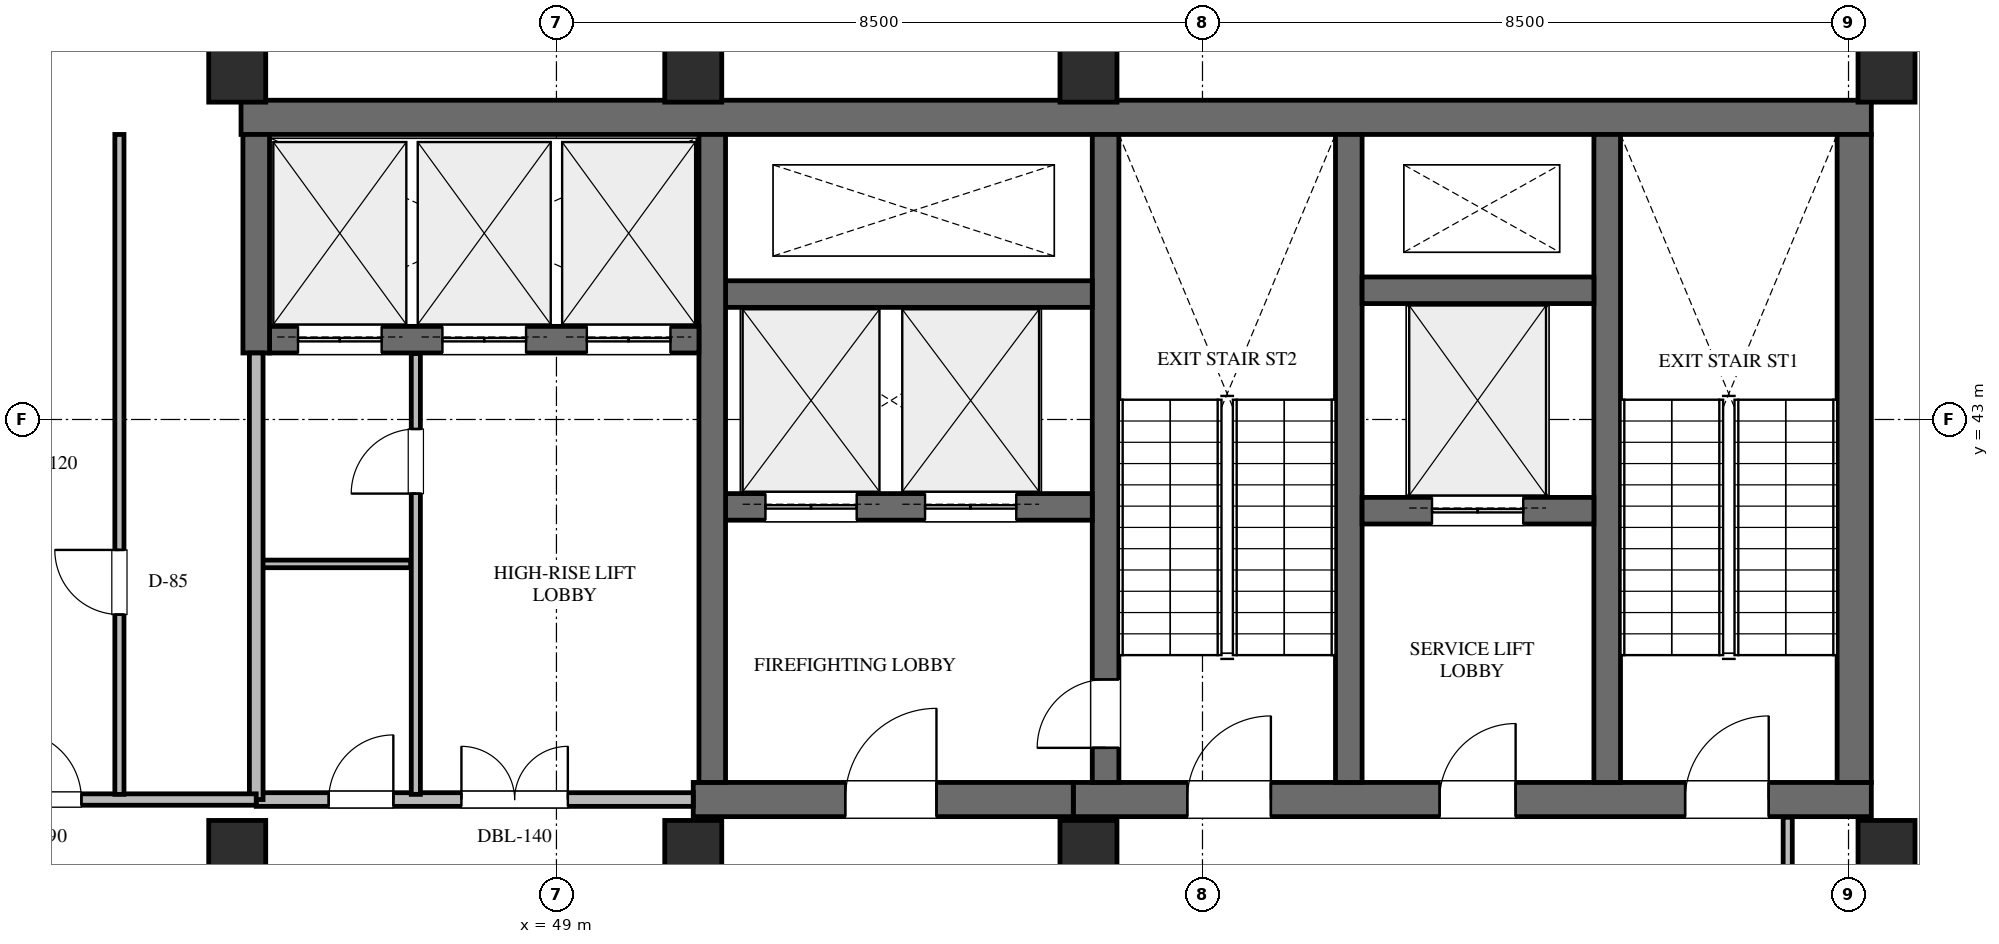
"""IFC4 building model, lengths in metres.
Left out: names, types, materials, properties, quantities, classifications, styles, units other than length and angle.
Written with IfcOpenShell. Run it as: python <this file> out.ifc"""

import sys

from ifc_helpers import new_model, si_unit, direction, frame, frame_2d, origin, origin_2d, place, context, subcontext, project, spatial, rectangle, extrude, element, fill, save


model = new_model("IFC4")
c1 = context("Model", 3, precision=1e-05, world=origin(), true_north=direction((0.0, 1.0)))
c2 = subcontext(c1, "Body", "Model", "MODEL_VIEW")
j1 = project(units=[si_unit("LENGTHUNIT", "METRE"), si_unit("PLANEANGLEUNIT", "RADIAN")], contexts=[c1])
p1 = place(None, origin())
s1 = spatial("IfcSite", under=j1, at=p1, CompositionType="ELEMENT")
p2 = place(p1, origin())
s2 = spatial("IfcBuilding", under=s1, at=p2, CompositionType="ELEMENT")
p3 = place(p2, frame((0.0, 0.0, 311.1)))
s3 = spatial("IfcBuildingStorey", under=s2, at=p3, CompositionType="ELEMENT", Elevation=311.1)
p4 = place(p3, frame((44.85, 46.975, 0.0), z_axis=(0.0, 0.0, 1.0), x_axis=(1.0, 0.0, 0.0)))
e1 = element("IfcWall", 1, at=p4, inside=s3, PredefinedType="SHEAR", context=c2, shape_type="SweptSolid", body=[
    extrude(rectangle(XDim=21.45, YDim=0.45, at=frame_2d((10.725, 0.0))), origin(), (0.0, 0.0, 1.0), 4.5),
])
p5 = place(p3, frame((55.8, 38.0, 0.0), z_axis=(0.0, 0.0, 1.0), x_axis=(1.0, 0.0, 0.0)))
e2 = element("IfcWall", 2, at=p5, inside=s3, PredefinedType="SHEAR", context=c2, shape_type="SweptSolid", body=[
    extrude(rectangle(XDim=10.5, YDim=0.45, at=frame_2d((5.25, 0.0))), origin(), (0.0, 0.0, 1.0), 4.5),
])
p6 = place(p5, frame((1.5, 0.0, 0.0)))
e3 = element("IfcOpeningElement", 3, at=p6, cuts=e2, PredefinedType="OPENING", context=c2, shape_type="SweptSolid", body=[
    extrude(rectangle(XDim=1.1, YDim=2.2, at=frame_2d((0.55, 1.1))), frame((0.0, 0.235, 0.0), z_axis=(0.0, -1.0, 0.0), x_axis=(1.0, 0.0, 0.0)), (0.0, 0.0, 1.0), 0.47),
])
p7 = place(p5, frame((4.82, 0.0, 0.0)))
e4 = element("IfcOpeningElement", 4, at=p7, cuts=e2, PredefinedType="OPENING", context=c2, shape_type="SweptSolid", body=[
    extrude(rectangle(XDim=1.0, YDim=2.15, at=frame_2d((0.5, 1.075))), frame((0.0, 0.235, 0.0), z_axis=(0.0, -1.0, 0.0), x_axis=(1.0, 0.0, 0.0)), (0.0, 0.0, 1.0), 0.47),
])
p8 = place(p5, frame((8.05, 0.0, 0.0)))
e5 = element("IfcOpeningElement", 5, at=p8, cuts=e2, PredefinedType="OPENING", context=c2, shape_type="SweptSolid", body=[
    extrude(rectangle(XDim=1.1, YDim=2.2, at=frame_2d((0.55, 1.1))), frame((0.0, 0.235, 0.0), z_axis=(0.0, -1.0, 0.0), x_axis=(1.0, 0.0, 0.0)), (0.0, 0.0, 1.0), 0.47),
])
p9 = place(p3, frame((66.075, 38.225, 0.0), z_axis=(0.0, 0.0, 1.0), x_axis=(0.0, 1.0, 0.0)))
e6 = element("IfcWall", 6, at=p9, inside=s3, PredefinedType="SHEAR", context=c2, shape_type="SweptSolid", body=[
    extrude(rectangle(XDim=8.525, YDim=0.45, at=frame_2d((4.262, 0.0))), origin(), (0.0, 0.0, 1.0), 4.5),
])
for number, where, z_axis, x_axis in (
    (7, (62.825, 38.225, 0.0), (0.0, 0.0, 1.0), (0.0, 1.0, 0.0)),
    (8, (59.425, 38.225, 0.0), (0.0, 0.0, 1.0), (0.0, 1.0, 0.0)),
):
    element("IfcWall", number, at=place(p3, frame(where, z_axis=z_axis, x_axis=x_axis)), inside=s3, PredefinedType="SHEAR", context=c2, shape_type="SweptSolid", body=[
        extrude(rectangle(XDim=8.525, YDim=0.35, at=frame_2d((4.262, 0.0))), origin(), (0.0, 0.0, 1.0), 4.5),
    ])
p10 = place(p3, frame((56.225, 38.225, 0.0), z_axis=(0.0, 0.0, 1.0), x_axis=(0.0, 1.0, 0.0)))
e9 = element("IfcWall", 9, at=p10, inside=s3, PredefinedType="SHEAR", context=c2, shape_type="SweptSolid", body=[
    extrude(rectangle(XDim=8.525, YDim=0.35, at=frame_2d((4.262, 0.0))), origin(), (0.0, 0.0, 1.0), 4.5),
])
p11 = place(p10, frame((0.455, 0.0, 0.0)))
e10 = element("IfcOpeningElement", 10, at=p11, cuts=e9, PredefinedType="OPENING", context=c2, shape_type="SweptSolid", body=[
    extrude(rectangle(XDim=0.9, YDim=2.15, at=frame_2d((0.45, 1.075))), frame((0.0, 0.185, 0.0), z_axis=(0.0, -1.0, 0.0), x_axis=(1.0, 0.0, 0.0)), (0.0, 0.0, 1.0), 0.37),
])
p12 = place(p3, frame((59.6, 41.8, 0.0), z_axis=(0.0, 0.0, 1.0), x_axis=(1.0, 0.0, 0.0)))
e11 = element("IfcWall", 11, at=p12, inside=s3, PredefinedType="SHEAR", context=c2, shape_type="SweptSolid", body=[
    extrude(rectangle(XDim=3.05, YDim=0.35, at=frame_2d((1.525, 0.0))), origin(), (0.0, 0.0, 1.0), 4.5),
])
p13 = place(p12, frame((0.92, 0.0, 0.0)))
e12 = element("IfcOpeningElement", 12, at=p13, cuts=e11, PredefinedType="OPENING", context=c2, shape_type="SweptSolid", body=[
    extrude(rectangle(XDim=1.2, YDim=2.2, at=frame_2d((0.6, 1.1))), frame((0.0, 0.185, 0.0), z_axis=(0.0, -1.0, 0.0), x_axis=(1.0, 0.0, 0.0)), (0.0, 0.0, 1.0), 0.37),
])
p14 = place(p3, frame((59.6, 44.7, 0.0), z_axis=(0.0, 0.0, 1.0), x_axis=(1.0, 0.0, 0.0)))
e13 = element("IfcWall", 13, at=p14, inside=s3, PredefinedType="SHEAR", context=c2, shape_type="SweptSolid", body=[
    extrude(rectangle(XDim=3.05, YDim=0.35, at=frame_2d((1.525, 0.0))), origin(), (0.0, 0.0, 1.0), 4.5),
])
p15 = place(p3, frame((50.8, 38.0, 0.0), z_axis=(0.0, 0.0, 1.0), x_axis=(1.0, 0.0, 0.0)))
e14 = element("IfcWall", 14, at=p15, inside=s3, PredefinedType="SHEAR", context=c2, shape_type="SweptSolid", body=[
    extrude(rectangle(XDim=5.0, YDim=0.45, at=frame_2d((2.5, 0.0))), origin(), (0.0, 0.0, 1.0), 4.5),
])
p16 = place(p15, frame((2.0, 0.0, 0.0)))
e15 = element("IfcOpeningElement", 15, at=p16, cuts=e14, PredefinedType="OPENING", context=c2, shape_type="SweptSolid", body=[
    extrude(rectangle(XDim=1.2, YDim=2.2, at=frame_2d((0.6, 1.1))), frame((0.0, 0.235, 0.0), z_axis=(0.0, -1.0, 0.0), x_axis=(1.0, 0.0, 0.0)), (0.0, 0.0, 1.0), 0.47),
])
p17 = place(p3, frame((51.225, 41.85, 0.0), z_axis=(0.0, 0.0, 1.0), x_axis=(1.0, 0.0, 0.0)))
e16 = element("IfcWall", 16, at=p17, inside=s3, PredefinedType="SHEAR", context=c2, shape_type="SweptSolid", body=[
    extrude(rectangle(XDim=4.825, YDim=0.35, at=frame_2d((2.413, 0.0))), origin(), (0.0, 0.0, 1.0), 4.5),
])
p18 = place(p17, frame((0.525, 0.0, 0.0)))
e17 = element("IfcOpeningElement", 17, at=p18, cuts=e16, PredefinedType="OPENING", context=c2, shape_type="SweptSolid", body=[
    extrude(rectangle(XDim=1.2, YDim=2.2, at=frame_2d((0.6, 1.1))), frame((0.0, 0.185, 0.0), z_axis=(0.0, -1.0, 0.0), x_axis=(1.0, 0.0, 0.0)), (0.0, 0.0, 1.0), 0.37),
])
p19 = place(p17, frame((2.625, 0.0, 0.0)))
e18 = element("IfcOpeningElement", 18, at=p19, cuts=e16, PredefinedType="OPENING", context=c2, shape_type="SweptSolid", body=[
    extrude(rectangle(XDim=1.2, YDim=2.2, at=frame_2d((0.6, 1.1))), frame((0.0, 0.185, 0.0), z_axis=(0.0, -1.0, 0.0), x_axis=(1.0, 0.0, 0.0)), (0.0, 0.0, 1.0), 0.37),
])
p20 = place(p3, frame((51.225, 44.65, 0.0), z_axis=(0.0, 0.0, 1.0), x_axis=(1.0, 0.0, 0.0)))
e19 = element("IfcWall", 19, at=p20, inside=s3, PredefinedType="SHEAR", context=c2, shape_type="SweptSolid", body=[
    extrude(rectangle(XDim=4.825, YDim=0.35, at=frame_2d((2.413, 0.0))), origin(), (0.0, 0.0, 1.0), 4.5),
])
p21 = place(p3, frame((51.05, 38.225, 0.0), z_axis=(0.0, 0.0, 1.0), x_axis=(0.0, 1.0, 0.0)))
e20 = element("IfcWall", 20, at=p21, inside=s3, PredefinedType="SHEAR", context=c2, shape_type="SweptSolid", body=[
    extrude(rectangle(XDim=8.525, YDim=0.35, at=frame_2d((4.262, 0.0))), origin(), (0.0, 0.0, 1.0), 4.5),
])
p22 = place(p3, frame((45.225, 44.05, 0.0), z_axis=(0.0, 0.0, 1.0), x_axis=(1.0, 0.0, 0.0)))
e21 = element("IfcWall", 21, at=p22, inside=s3, PredefinedType="SHEAR", context=c2, shape_type="SweptSolid", body=[
    extrude(rectangle(XDim=5.65, YDim=0.35, at=frame_2d((2.825, 0.0))), origin(), (0.0, 0.0, 1.0), 4.5),
])
p23 = place(p22, frame((0.375, 0.0, 0.0)))
e22 = element("IfcOpeningElement", 22, at=p23, cuts=e21, PredefinedType="OPENING", context=c2, shape_type="SweptSolid", body=[
    extrude(rectangle(XDim=1.1, YDim=2.2, at=frame_2d((0.55, 1.1))), frame((0.0, 0.185, 0.0), z_axis=(0.0, -1.0, 0.0), x_axis=(1.0, 0.0, 0.0)), (0.0, 0.0, 1.0), 0.37),
])
p24 = place(p22, frame((2.275, 0.0, 0.0)))
e23 = element("IfcOpeningElement", 23, at=p24, cuts=e21, PredefinedType="OPENING", context=c2, shape_type="SweptSolid", body=[
    extrude(rectangle(XDim=1.1, YDim=2.2, at=frame_2d((0.55, 1.1))), frame((0.0, 0.185, 0.0), z_axis=(0.0, -1.0, 0.0), x_axis=(1.0, 0.0, 0.0)), (0.0, 0.0, 1.0), 0.37),
])
p25 = place(p22, frame((4.175, 0.0, 0.0)))
e24 = element("IfcOpeningElement", 24, at=p25, cuts=e21, PredefinedType="OPENING", context=c2, shape_type="SweptSolid", body=[
    extrude(rectangle(XDim=1.1, YDim=2.2, at=frame_2d((0.55, 1.1))), frame((0.0, 0.185, 0.0), z_axis=(0.0, -1.0, 0.0), x_axis=(1.0, 0.0, 0.0)), (0.0, 0.0, 1.0), 0.37),
])
p26 = place(p3, frame((45.05, 43.875, 0.0), z_axis=(0.0, 0.0, 1.0), x_axis=(0.0, 1.0, 0.0)))
e25 = element("IfcWall", 25, at=p26, inside=s3, PredefinedType="SHEAR", context=c2, shape_type="SweptSolid", body=[
    extrude(rectangle(XDim=2.875, YDim=0.35, at=frame_2d((1.438, 0.0))), origin(), (0.0, 0.0, 1.0), 4.5),
])
for number, where, z_axis, x_axis in (
    (26, (66.5, 47.55, 0.0), (0.0, 0.0, 1.0), (1.0, 0.0, 0.0)),
    (27, (56.0, 47.55, 0.0), (0.0, 0.0, 1.0), (1.0, 0.0, 0.0)),
    (28, (66.5, 37.35, 0.0), (0.0, 0.0, 1.0), (1.0, 0.0, 0.0)),
    (29, (56.0, 37.35, 0.0), (0.0, 0.0, 1.0), (1.0, 0.0, 0.0)),
    (30, (50.8, 47.55, 0.0), (0.0, 0.0, 1.0), (1.0, 0.0, 0.0)),
    (31, (50.8, 37.35, 0.0), (0.0, 0.0, 1.0), (1.0, 0.0, 0.0)),
    (32, (44.8, 37.35, 0.0), (0.0, 0.0, 1.0), (1.0, 0.0, 0.0)),
    (33, (44.8, 47.55, 0.0), (0.0, 0.0, 1.0), (1.0, 0.0, 0.0)),
):
    element("IfcColumn", number, at=place(p3, frame(where, z_axis=z_axis, x_axis=x_axis)), inside=s3, PredefinedType="COLUMN", context=c2, shape_type="SweptSolid", body=[
        extrude(rectangle(XDim=0.75, YDim=0.75, at=origin_2d()), origin(), (0.0, 0.0, 1.0), 4.5),
    ])
p27 = place(p3, frame((45.05, 38.0, 0.0), z_axis=(0.0, 0.0, 1.0), x_axis=(1.0, 0.0, 0.0)))
e34 = element("IfcWall", 34, at=p27, inside=s3, PredefinedType="STANDARD", context=c2, shape_type="SweptSolid", body=[
    extrude(rectangle(XDim=5.75, YDim=0.18, at=frame_2d((2.875, 0.0))), origin(), (0.0, 0.0, 1.0), 3.609),
])
p28 = place(p27, frame((0.954, 0.0, 0.0)))
e35 = element("IfcOpeningElement", 35, at=p28, cuts=e34, PredefinedType="OPENING", context=c2, shape_type="SweptSolid", body=[
    extrude(rectangle(XDim=0.85, YDim=2.1, at=frame_2d((0.425, 1.05))), frame((0.0, 0.1, 0.0), z_axis=(0.0, -1.0, 0.0), x_axis=(1.0, 0.0, 0.0)), (0.0, 0.0, 1.0), 0.2),
])
p29 = place(p27, frame((2.7, 0.0, 0.0)))
e36 = element("IfcOpeningElement", 36, at=p29, cuts=e34, PredefinedType="OPENING", context=c2, shape_type="SweptSolid", body=[
    extrude(rectangle(XDim=1.4, YDim=2.2, at=frame_2d((0.7, 1.1))), frame((0.0, 0.1, 0.0), z_axis=(0.0, -1.0, 0.0), x_axis=(1.0, 0.0, 0.0)), (0.0, 0.0, 1.0), 0.2),
])
p30 = place(p3, frame((47.15, 38.068, 0.0), z_axis=(0.0, 0.0, 1.0), x_axis=(0.0, 1.0, 0.0)))
e37 = element("IfcWall", 37, at=p30, inside=s3, PredefinedType="PARTITIONING", context=c2, shape_type="SweptSolid", body=[
    extrude(rectangle(XDim=5.799, YDim=0.12, at=frame_2d((2.899, 0.0))), origin(), (0.0, 0.0, 1.0), 4.22),
])
p31 = place(p30, frame((3.957, 0.0, 0.0)))
e38 = element("IfcOpeningElement", 38, at=p31, cuts=e37, PredefinedType="OPENING", context=c2, shape_type="SweptSolid", body=[
    extrude(rectangle(XDim=0.85, YDim=2.1, at=frame_2d((0.425, 1.05))), frame((0.0, 0.07, 0.0), z_axis=(0.0, -1.0, 0.0), x_axis=(1.0, 0.0, 0.0)), (0.0, 0.0, 1.0), 0.14),
])
p32 = place(p3, frame((45.118, 41.1, 0.0), z_axis=(0.0, 0.0, 1.0), x_axis=(1.0, 0.0, 0.0)))
e39 = element("IfcWall", 39, at=p32, inside=s3, PredefinedType="PARTITIONING", context=c2, shape_type="SweptSolid", body=[
    extrude(rectangle(XDim=1.964, YDim=0.1, at=frame_2d((0.982, 0.0))), origin(), (0.0, 0.0, 1.0), 4.22),
])
p33 = place(p3, frame((45.05, 38.0, 0.0), z_axis=(0.0, 0.0, 1.0), x_axis=(0.0, 1.0, 0.0)))
e40 = element("IfcWall", 40, at=p33, inside=s3, PredefinedType="STANDARD", context=c2, shape_type="SweptSolid", body=[
    extrude(rectangle(XDim=5.875, YDim=0.18, at=frame_2d((2.938, 0.0))), origin(), (0.0, 0.0, 1.0), 3.609),
])
p34 = place(p3, frame((34.285, 38.0, 0.0), z_axis=(0.0, 0.0, 1.0), x_axis=(1.0, 0.0, 0.0)))
e41 = element("IfcWall", 41, at=p34, inside=s3, PredefinedType="PARTITIONING", context=c2, shape_type="SweptSolid", body=[
    extrude(rectangle(XDim=10.765, YDim=0.15, at=frame_2d((5.383, 0.0))), origin(), (0.0, 0.0, 1.0), 3.609),
])
p35 = place(p34, frame((5.79, 0.0, 0.0)))
e42 = element("IfcOpeningElement", 42, at=p35, cuts=e41, PredefinedType="OPENING", context=c2, shape_type="SweptSolid", body=[
    extrude(rectangle(XDim=0.95, YDim=2.15, at=frame_2d((0.475, 1.075))), frame((0.0, 0.085, 0.0), z_axis=(0.0, -1.0, 0.0), x_axis=(1.0, 0.0, 0.0)), (0.0, 0.0, 1.0), 0.17),
])
p36 = place(p34, frame((7.565, 0.0, 0.0)))
e43 = element("IfcOpeningElement", 43, at=p36, cuts=e41, PredefinedType="OPENING", context=c2, shape_type="SweptSolid", body=[
    extrude(rectangle(XDim=0.9, YDim=2.1, at=frame_2d((0.45, 1.05))), frame((0.0, 0.085, 0.0), z_axis=(0.0, -1.0, 0.0), x_axis=(1.0, 0.0, 0.0)), (0.0, 0.0, 1.0), 0.17),
])
p37 = place(p3, frame((43.25, 38.068, 0.0), z_axis=(0.0, 0.0, 1.0), x_axis=(0.0, 1.0, 0.0)))
e44 = element("IfcWall", 44, at=p37, inside=s3, PredefinedType="PARTITIONING", context=c2, shape_type="SweptSolid", body=[
    extrude(rectangle(XDim=8.682, YDim=0.12, at=frame_2d((4.341, 0.0))), origin(), (0.0, 0.0, 1.0), 4.22),
])
p38 = place(p37, frame((2.366, 0.0, 0.0)))
e45 = element("IfcOpeningElement", 45, at=p38, cuts=e44, PredefinedType="OPENING", context=c2, shape_type="SweptSolid", body=[
    extrude(rectangle(XDim=0.85, YDim=2.1, at=frame_2d((0.425, 1.05))), frame((0.0, 0.07, 0.0), z_axis=(0.0, -1.0, 0.0), x_axis=(1.0, 0.0, 0.0)), (0.0, 0.0, 1.0), 0.14),
])
p39 = place(p3, frame((65.2, 34.4, 0.0), z_axis=(0.0, 0.0, 1.0), x_axis=(0.0, 1.0, 0.0)))
e46 = element("IfcWall", 46, at=p39, inside=s3, PredefinedType="PARTITIONING", context=c2, shape_type="SweptSolid", body=[
    extrude(rectangle(XDim=3.367, YDim=0.12, at=frame_2d((1.684, 0.0))), origin(), (0.0, 0.0, 1.0), 3.609),
])
p40 = place(p6, origin())
e47 = element("IfcDoor", 47, at=p40, inside=s3, OperationType="SINGLE_SWING_RIGHT", PredefinedType="DOOR", context=c2, shape_type="SweptSolid", body=[
    extrude(rectangle(XDim=1.1, YDim=2.2, at=frame_2d((0.55, 1.1))), frame((0.0, 0.025, 0.0), z_axis=(0.0, -1.0, 0.0), x_axis=(1.0, 0.0, 0.0)), (0.0, 0.0, 1.0), 0.05),
])
fill(e3, e47)
p41 = place(p7, origin())
e48 = element("IfcDoor", 48, at=p41, inside=s3, OperationType="SINGLE_SWING_RIGHT", PredefinedType="DOOR", context=c2, shape_type="SweptSolid", body=[
    extrude(rectangle(XDim=1.0, YDim=2.15, at=frame_2d((0.5, 1.075))), frame((0.0, 0.025, 0.0), z_axis=(0.0, -1.0, 0.0), x_axis=(1.0, 0.0, 0.0)), (0.0, 0.0, 1.0), 0.05),
])
fill(e4, e48)
p42 = place(p8, origin())
e49 = element("IfcDoor", 49, at=p42, inside=s3, OperationType="SINGLE_SWING_RIGHT", PredefinedType="DOOR", context=c2, shape_type="SweptSolid", body=[
    extrude(rectangle(XDim=1.1, YDim=2.2, at=frame_2d((0.55, 1.1))), frame((0.0, 0.025, 0.0), z_axis=(0.0, -1.0, 0.0), x_axis=(1.0, 0.0, 0.0)), (0.0, 0.0, 1.0), 0.05),
])
fill(e5, e49)
p43 = place(p16, origin())
e50 = element("IfcDoor", 50, at=p43, inside=s3, OperationType="SINGLE_SWING_RIGHT", PredefinedType="DOOR", context=c2, shape_type="SweptSolid", body=[
    extrude(rectangle(XDim=1.2, YDim=2.2, at=frame_2d((0.6, 1.1))), frame((0.0, 0.025, 0.0), z_axis=(0.0, -1.0, 0.0), x_axis=(1.0, 0.0, 0.0)), (0.0, 0.0, 1.0), 0.05),
])
fill(e15, e50)
p44 = place(p11, origin())
e51 = element("IfcDoor", 51, at=p44, inside=s3, OperationType="SINGLE_SWING_LEFT", PredefinedType="DOOR", context=c2, shape_type="SweptSolid", body=[
    extrude(rectangle(XDim=0.9, YDim=2.15, at=frame_2d((0.45, 1.075))), frame((0.0, 0.025, 0.0), z_axis=(0.0, -1.0, 0.0), x_axis=(1.0, 0.0, 0.0)), (0.0, 0.0, 1.0), 0.05),
])
fill(e10, e51)
p45 = place(p23, origin())
e52 = element("IfcDoor", 52, at=p45, inside=s3, OperationType="DOUBLE_DOOR_SLIDING", PredefinedType="DOOR", context=c2, shape_type="SweptSolid", body=[
    extrude(rectangle(XDim=1.1, YDim=2.2, at=frame_2d((0.55, 1.1))), frame((0.0, 0.025, 0.0), z_axis=(0.0, -1.0, 0.0), x_axis=(1.0, 0.0, 0.0)), (0.0, 0.0, 1.0), 0.05),
])
fill(e22, e52)
p46 = place(p24, origin())
e53 = element("IfcDoor", 53, at=p46, inside=s3, OperationType="DOUBLE_DOOR_SLIDING", PredefinedType="DOOR", context=c2, shape_type="SweptSolid", body=[
    extrude(rectangle(XDim=1.1, YDim=2.2, at=frame_2d((0.55, 1.1))), frame((0.0, 0.025, 0.0), z_axis=(0.0, -1.0, 0.0), x_axis=(1.0, 0.0, 0.0)), (0.0, 0.0, 1.0), 0.05),
])
fill(e23, e53)
p47 = place(p25, origin())
e54 = element("IfcDoor", 54, at=p47, inside=s3, OperationType="DOUBLE_DOOR_SLIDING", PredefinedType="DOOR", context=c2, shape_type="SweptSolid", body=[
    extrude(rectangle(XDim=1.1, YDim=2.2, at=frame_2d((0.55, 1.1))), frame((0.0, 0.025, 0.0), z_axis=(0.0, -1.0, 0.0), x_axis=(1.0, 0.0, 0.0)), (0.0, 0.0, 1.0), 0.05),
])
fill(e24, e54)
p48 = place(p18, origin())
e55 = element("IfcDoor", 55, at=p48, inside=s3, OperationType="DOUBLE_DOOR_SLIDING", PredefinedType="DOOR", context=c2, shape_type="SweptSolid", body=[
    extrude(rectangle(XDim=1.2, YDim=2.2, at=frame_2d((0.6, 1.1))), frame((0.0, 0.025, 0.0), z_axis=(0.0, -1.0, 0.0), x_axis=(1.0, 0.0, 0.0)), (0.0, 0.0, 1.0), 0.05),
])
fill(e17, e55)
p49 = place(p19, origin())
e56 = element("IfcDoor", 56, at=p49, inside=s3, OperationType="DOUBLE_DOOR_SLIDING", PredefinedType="DOOR", context=c2, shape_type="SweptSolid", body=[
    extrude(rectangle(XDim=1.2, YDim=2.2, at=frame_2d((0.6, 1.1))), frame((0.0, 0.025, 0.0), z_axis=(0.0, -1.0, 0.0), x_axis=(1.0, 0.0, 0.0)), (0.0, 0.0, 1.0), 0.05),
])
fill(e18, e56)
p50 = place(p13, origin())
e57 = element("IfcDoor", 57, at=p50, inside=s3, OperationType="DOUBLE_DOOR_SLIDING", PredefinedType="DOOR", context=c2, shape_type="SweptSolid", body=[
    extrude(rectangle(XDim=1.2, YDim=2.2, at=frame_2d((0.6, 1.1))), frame((0.0, 0.025, 0.0), z_axis=(0.0, -1.0, 0.0), x_axis=(1.0, 0.0, 0.0)), (0.0, 0.0, 1.0), 0.05),
])
fill(e12, e57)
p51 = place(p28, origin())
e58 = element("IfcDoor", 58, at=p51, inside=s3, OperationType="SINGLE_SWING_RIGHT", PredefinedType="DOOR", context=c2, shape_type="SweptSolid", body=[
    extrude(rectangle(XDim=0.85, YDim=2.1, at=frame_2d((0.425, 1.05))), frame((0.0, 0.025, 0.0), z_axis=(0.0, -1.0, 0.0), x_axis=(1.0, 0.0, 0.0)), (0.0, 0.0, 1.0), 0.05),
])
fill(e35, e58)
p52 = place(p31, origin())
e59 = element("IfcDoor", 59, at=p52, inside=s3, OperationType="SINGLE_SWING_LEFT", PredefinedType="DOOR", context=c2, shape_type="SweptSolid", body=[
    extrude(rectangle(XDim=0.85, YDim=2.1, at=frame_2d((0.425, 1.05))), frame((0.0, 0.025, 0.0), z_axis=(0.0, -1.0, 0.0), x_axis=(1.0, 0.0, 0.0)), (0.0, 0.0, 1.0), 0.05),
])
fill(e38, e59)
p53 = place(p29, origin())
e60 = element("IfcDoor", 60, at=p53, inside=s3, OperationType="DOUBLE_DOOR_SINGLE_SWING", PredefinedType="DOOR", context=c2, shape_type="SweptSolid", body=[
    extrude(rectangle(XDim=1.4, YDim=2.2, at=frame_2d((0.7, 1.1))), frame((0.0, 0.025, 0.0), z_axis=(0.0, -1.0, 0.0), x_axis=(1.0, 0.0, 0.0)), (0.0, 0.0, 1.0), 0.05),
])
fill(e36, e60)
p54 = place(p36, origin())
e61 = element("IfcDoor", 61, at=p54, inside=s3, OperationType="SINGLE_SWING_LEFT", PredefinedType="DOOR", context=c2, shape_type="SweptSolid", body=[
    extrude(rectangle(XDim=0.9, YDim=2.1, at=frame_2d((0.45, 1.05))), frame((0.0, 0.025, 0.0), z_axis=(0.0, -1.0, 0.0), x_axis=(1.0, 0.0, 0.0)), (0.0, 0.0, 1.0), 0.05),
])
fill(e43, e61)
p55 = place(p38, origin())
e62 = element("IfcDoor", 62, at=p55, inside=s3, OperationType="SINGLE_SWING_RIGHT", PredefinedType="DOOR", context=c2, shape_type="SweptSolid", body=[
    extrude(rectangle(XDim=0.85, YDim=2.1, at=frame_2d((0.425, 1.05))), frame((0.0, 0.025, 0.0), z_axis=(0.0, -1.0, 0.0), x_axis=(1.0, 0.0, 0.0)), (0.0, 0.0, 1.0), 0.05),
])
fill(e45, e62)
save(model, sys.argv[1])
